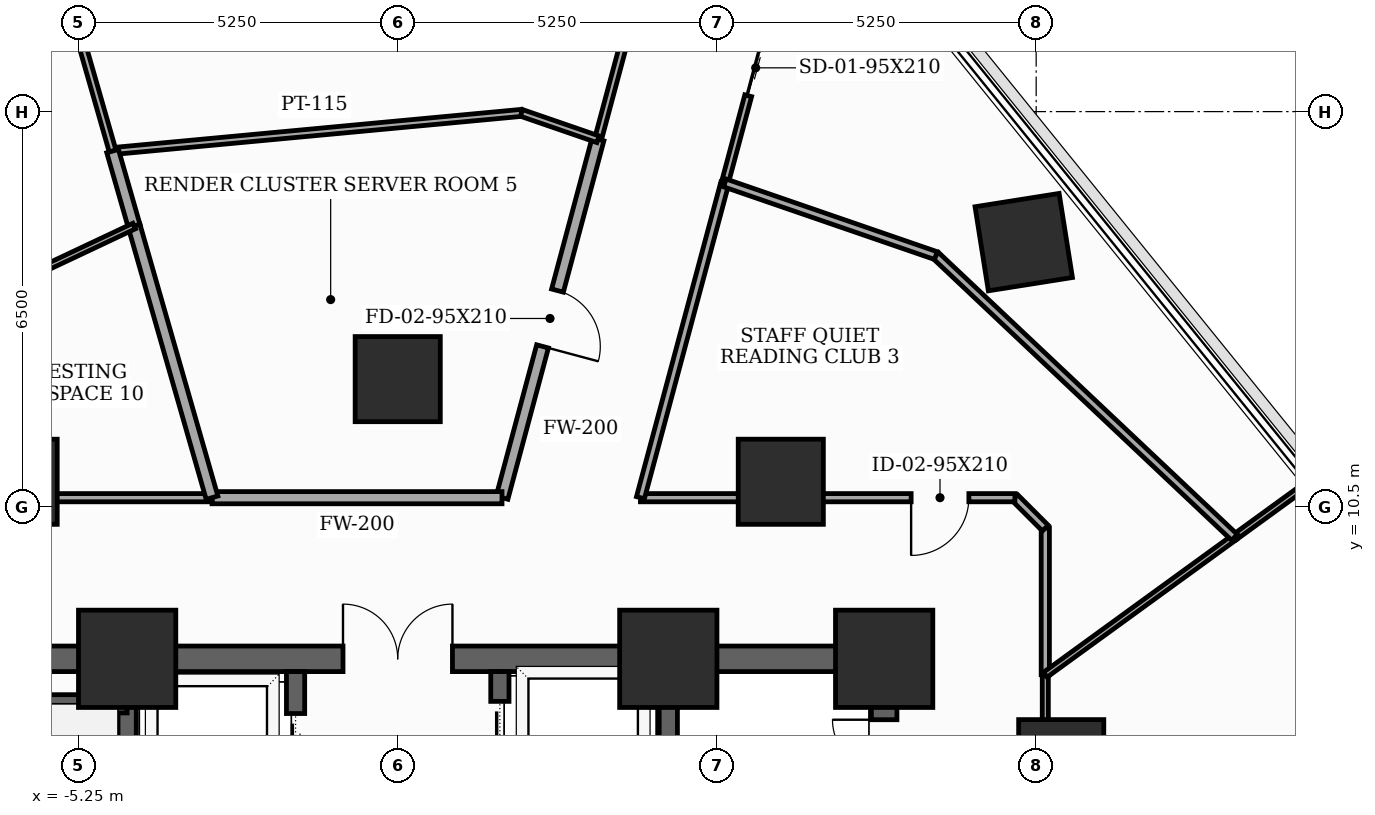
"""IFC4 building model, lengths in metres.
Left out: names, types, materials, properties, quantities, classifications, styles, units other than length and angle.
Written with IfcOpenShell. Run it as: python <this file> out.ifc"""

import sys

from ifc_helpers import new_model, si_unit, direction, frame, frame_2d, origin, origin_2d, place, context, subcontext, project, spatial, rectangle, extrude, element, fill, save


model = new_model("IFC4")
c1 = context("Model", 3, precision=1e-05, world=origin(), true_north=direction((0.0, 1.0)))
c2 = subcontext(c1, "Body", "Model", "MODEL_VIEW")
j1 = project(units=[si_unit("LENGTHUNIT", "METRE"), si_unit("PLANEANGLEUNIT", "RADIAN")], contexts=[c1])
p1 = place(None, origin())
s1 = spatial("IfcSite", under=j1, at=p1, CompositionType="ELEMENT")
p2 = place(p1, origin())
s2 = spatial("IfcBuilding", under=s1, at=p2, CompositionType="ELEMENT")
p3 = place(p2, frame((0.0, 0.0, 55.6)))
s3 = spatial("IfcBuildingStorey", under=s2, at=p3, CompositionType="ELEMENT", Elevation=55.6)
for number, where, z_axis, x_axis in (
    (1, (8.0, 8.0, 0.0), (0.0, 0.0, 1.0), (1.0, 0.0, 0.0)),
    (2, (4.45, 8.0, 0.0), (0.0, 0.0, 1.0), (1.0, 0.0, 0.0)),
    (3, (-4.45, 8.0, 0.0), (0.0, 0.0, 1.0), (1.0, 0.0, 0.0)),
):
    element("IfcColumn", number, at=place(p3, frame(where, z_axis=z_axis, x_axis=x_axis)), inside=s3, PredefinedType="COLUMN", context=c2, shape_type="SweptSolid", body=[
        extrude(rectangle(XDim=1.6, YDim=1.6, at=origin_2d()), origin(), (0.0, 0.0, 1.0), 3.7),
    ])
for number, where, z_axis, x_axis in (
    (4, (10.912, 6.3, 0.0), (0.0, 0.0, 1.0), (1.0, 0.0, 0.0)),
    (5, (6.3, 10.912, 0.0), (0.0, 0.0, 1.0), (1.0, 0.0, 0.0)),
    (6, (0.0, 12.6, 0.0), (0.0, 0.0, 1.0), (1.0, 0.0, 0.0)),
    (7, (-6.3, 10.912, 0.0), (0.0, 0.0, 1.0), (1.0, 0.0, 0.0)),
    (8, (10.295, 14.853, 0.0), (0.0, 0.0, 1.0), (0.988, 0.156, 0.0)),
):
    element("IfcColumn", number, at=place(p3, frame(where, z_axis=z_axis, x_axis=x_axis)), inside=s3, PredefinedType="COLUMN", context=c2, shape_type="SweptSolid", body=[
        extrude(rectangle(XDim=1.4, YDim=1.4, at=origin_2d()), origin(), (0.0, 0.0, 1.0), 3.7),
    ])
p4 = place(p3, frame((8.0, -8.0, 0.0), z_axis=(0.0, 0.0, 1.0), x_axis=(0.0, 1.0, 0.0)))
e9 = element("IfcWall", 9, at=p4, inside=s3, PredefinedType="SHEAR", context=c2, shape_type="SweptSolid", body=[
    extrude(rectangle(XDim=16.0, YDim=0.42, at=frame_2d((8.0, 0.0))), origin(), (0.0, 0.0, 1.0), 3.5),
])
p5 = place(p4, frame((9.6, 0.0, 0.0)))
e10 = element("IfcOpeningElement", 10, at=p5, cuts=e9, PredefinedType="OPENING", context=c2, shape_type="SweptSolid", body=[
    extrude(rectangle(XDim=1.05, YDim=2.15, at=frame_2d((0.525, 1.075))), frame((0.0, 0.22, 0.0), z_axis=(0.0, -1.0, 0.0), x_axis=(1.0, 0.0, 0.0)), (0.0, 0.0, 1.0), 0.44),
])
p6 = place(p4, frame((14.148, 0.0, 0.0)))
e11 = element("IfcOpeningElement", 11, at=p6, cuts=e9, PredefinedType="OPENING", context=c2, shape_type="SweptSolid", body=[
    extrude(rectangle(XDim=0.85, YDim=2.02, at=frame_2d((0.425, 1.01))), frame((0.0, 0.22, 0.0), z_axis=(0.0, -1.0, 0.0), x_axis=(1.0, 0.0, 0.0)), (0.0, 0.0, 1.0), 0.44),
])
p7 = place(p3, frame((-8.0, 8.0, 0.0), z_axis=(0.0, 0.0, 1.0), x_axis=(1.0, 0.0, 0.0)))
e12 = element("IfcWall", 12, at=p7, inside=s3, PredefinedType="SHEAR", context=c2, shape_type="SweptSolid", body=[
    extrude(rectangle(XDim=16.0, YDim=0.42, at=frame_2d((8.0, 0.0))), origin(), (0.0, 0.0, 1.0), 3.5),
])
p8 = place(p7, frame((7.1, 0.0, 0.0)))
e13 = element("IfcOpeningElement", 13, at=p8, cuts=e12, PredefinedType="OPENING", context=c2, shape_type="SweptSolid", body=[
    extrude(rectangle(XDim=1.8, YDim=2.15, at=frame_2d((0.9, 1.075))), frame((0.0, 0.22, 0.0), z_axis=(0.0, -1.0, 0.0), x_axis=(1.0, 0.0, 0.0)), (0.0, 0.0, 1.0), 0.44),
])
for number, where, z_axis, x_axis in (
    (14, (-4.45, -7.79, 0.0), (0.0, 0.0, 1.0), (0.0, 1.0, 0.0)),
    (15, (4.45, -7.79, 0.0), (0.0, 0.0, 1.0), (0.0, 1.0, 0.0)),
):
    element("IfcWall", number, at=place(p3, frame(where, z_axis=z_axis, x_axis=x_axis)), inside=s3, PredefinedType="SHEAR", context=c2, shape_type="SweptSolid", body=[
        extrude(rectangle(XDim=15.58, YDim=0.3, at=frame_2d((7.79, 0.0))), origin(), (0.0, 0.0, 1.0), 3.5),
    ])
p9 = place(p3, frame((-7.79, 7.26, 0.0), z_axis=(0.0, 0.0, 1.0), x_axis=(1.0, 0.0, 0.0)))
e16 = element("IfcWall", 16, at=p9, inside=s3, PredefinedType="SHEAR", context=c2, shape_type="SweptSolid", body=[
    extrude(rectangle(XDim=3.34, YDim=0.3, at=frame_2d((1.67, 0.0))), origin(), (0.0, 0.0, 1.0), 3.5),
])
p10 = place(p3, frame((-1.68, -4.85, 0.0), z_axis=(0.0, 0.0, 1.0), x_axis=(0.0, 1.0, 0.0)))
e17 = element("IfcWall", 17, at=p10, inside=s3, PredefinedType="SHEAR", context=c2, shape_type="SweptSolid", body=[
    extrude(rectangle(XDim=12.64, YDim=0.3, at=frame_2d((6.32, 0.0))), origin(), (0.0, 0.0, 1.0), 3.5),
])
p11 = place(p10, frame((3.95, 0.0, 0.0)))
e18 = element("IfcOpeningElement", 18, at=p11, cuts=e17, PredefinedType="OPENING", context=c2, shape_type="SweptSolid", body=[
    extrude(rectangle(XDim=1.1, YDim=2.1, at=frame_2d((0.55, 1.05))), frame((0.0, 0.16, 0.0), z_axis=(0.0, -1.0, 0.0), x_axis=(1.0, 0.0, 0.0)), (0.0, 0.0, 1.0), 0.32),
])
p12 = place(p10, frame((6.25, 0.0, 0.0)))
e19 = element("IfcOpeningElement", 19, at=p12, cuts=e17, PredefinedType="OPENING", context=c2, shape_type="SweptSolid", body=[
    extrude(rectangle(XDim=1.1, YDim=2.1, at=frame_2d((0.55, 1.05))), frame((0.0, 0.16, 0.0), z_axis=(0.0, -1.0, 0.0), x_axis=(1.0, 0.0, 0.0)), (0.0, 0.0, 1.0), 0.32),
])
p13 = place(p10, frame((8.55, 0.0, 0.0)))
e20 = element("IfcOpeningElement", 20, at=p13, cuts=e17, PredefinedType="OPENING", context=c2, shape_type="SweptSolid", body=[
    extrude(rectangle(XDim=1.1, YDim=2.1, at=frame_2d((0.55, 1.05))), frame((0.0, 0.16, 0.0), z_axis=(0.0, -1.0, 0.0), x_axis=(1.0, 0.0, 0.0)), (0.0, 0.0, 1.0), 0.32),
])
p14 = place(p10, frame((10.85, 0.0, 0.0)))
e21 = element("IfcOpeningElement", 21, at=p14, cuts=e17, PredefinedType="OPENING", context=c2, shape_type="SweptSolid", body=[
    extrude(rectangle(XDim=1.1, YDim=2.1, at=frame_2d((0.55, 1.05))), frame((0.0, 0.16, 0.0), z_axis=(0.0, -1.0, 0.0), x_axis=(1.0, 0.0, 0.0)), (0.0, 0.0, 1.0), 0.32),
])
p15 = place(p10, frame((1.15, 0.0, 0.0)))
e22 = element("IfcOpeningElement", 22, at=p15, cuts=e17, PredefinedType="OPENING", context=c2, shape_type="SweptSolid", body=[
    extrude(rectangle(XDim=0.92, YDim=2.1, at=frame_2d((0.46, 1.05))), frame((0.0, 0.16, 0.0), z_axis=(0.0, -1.0, 0.0), x_axis=(1.0, 0.0, 0.0)), (0.0, 0.0, 1.0), 0.32),
])
p16 = place(p3, frame((1.68, -4.85, 0.0), z_axis=(0.0, 0.0, 1.0), x_axis=(0.0, 1.0, 0.0)))
e23 = element("IfcWall", 23, at=p16, inside=s3, PredefinedType="SHEAR", context=c2, shape_type="SweptSolid", body=[
    extrude(rectangle(XDim=12.64, YDim=0.3, at=frame_2d((6.32, 0.0))), origin(), (0.0, 0.0, 1.0), 3.5),
])
p17 = place(p16, frame((0.55, 0.0, 0.0)))
e24 = element("IfcOpeningElement", 24, at=p17, cuts=e23, PredefinedType="OPENING", context=c2, shape_type="SweptSolid", body=[
    extrude(rectangle(XDim=1.1, YDim=2.1, at=frame_2d((0.55, 1.05))), frame((0.0, 0.16, 0.0), z_axis=(0.0, -1.0, 0.0), x_axis=(1.0, 0.0, 0.0)), (0.0, 0.0, 1.0), 0.32),
])
p18 = place(p16, frame((2.65, 0.0, 0.0)))
e25 = element("IfcOpeningElement", 25, at=p18, cuts=e23, PredefinedType="OPENING", context=c2, shape_type="SweptSolid", body=[
    extrude(rectangle(XDim=1.1, YDim=2.1, at=frame_2d((0.55, 1.05))), frame((0.0, 0.16, 0.0), z_axis=(0.0, -1.0, 0.0), x_axis=(1.0, 0.0, 0.0)), (0.0, 0.0, 1.0), 0.32),
])
p19 = place(p16, frame((4.75, 0.0, 0.0)))
e26 = element("IfcOpeningElement", 26, at=p19, cuts=e23, PredefinedType="OPENING", context=c2, shape_type="SweptSolid", body=[
    extrude(rectangle(XDim=1.1, YDim=2.1, at=frame_2d((0.55, 1.05))), frame((0.0, 0.16, 0.0), z_axis=(0.0, -1.0, 0.0), x_axis=(1.0, 0.0, 0.0)), (0.0, 0.0, 1.0), 0.32),
])
p20 = place(p16, frame((6.85, 0.0, 0.0)))
e27 = element("IfcOpeningElement", 27, at=p20, cuts=e23, PredefinedType="OPENING", context=c2, shape_type="SweptSolid", body=[
    extrude(rectangle(XDim=1.1, YDim=2.1, at=frame_2d((0.55, 1.05))), frame((0.0, 0.16, 0.0), z_axis=(0.0, -1.0, 0.0), x_axis=(1.0, 0.0, 0.0)), (0.0, 0.0, 1.0), 0.32),
])
p21 = place(p16, frame((8.95, 0.0, 0.0)))
e28 = element("IfcOpeningElement", 28, at=p21, cuts=e23, PredefinedType="OPENING", context=c2, shape_type="SweptSolid", body=[
    extrude(rectangle(XDim=1.1, YDim=2.1, at=frame_2d((0.55, 1.05))), frame((0.0, 0.16, 0.0), z_axis=(0.0, -1.0, 0.0), x_axis=(1.0, 0.0, 0.0)), (0.0, 0.0, 1.0), 0.32),
])
p22 = place(p16, frame((11.05, 0.0, 0.0)))
e29 = element("IfcOpeningElement", 29, at=p22, cuts=e23, PredefinedType="OPENING", context=c2, shape_type="SweptSolid", body=[
    extrude(rectangle(XDim=1.1, YDim=2.1, at=frame_2d((0.55, 1.05))), frame((0.0, 0.16, 0.0), z_axis=(0.0, -1.0, 0.0), x_axis=(1.0, 0.0, 0.0)), (0.0, 0.0, 1.0), 0.32),
])
p23 = place(p3, frame((10.65, -1.715, 0.0), z_axis=(0.0, 0.0, 1.0), x_axis=(0.0, 1.0, 0.0)))
e30 = element("IfcWall", 30, at=p23, inside=s3, PredefinedType="MOVABLE", context=c2, shape_type="SweptSolid", body=[
    extrude(rectangle(XDim=9.453, YDim=0.1, at=frame_2d((4.727, 0.0))), origin(), (0.0, 0.0, 1.0), 2.785),
])
p24 = place(p3, frame((10.65, 7.738, 0.0), z_axis=(0.0, 0.0, 1.0), x_axis=(0.0, 1.0, 0.0)))
e31 = element("IfcWall", 31, at=p24, inside=s3, PredefinedType="PARTITIONING", context=c2, shape_type="SweptSolid", body=[
    extrude(rectangle(XDim=2.412, YDim=0.135, at=frame_2d((1.206, 0.0))), origin(), (0.0, 0.0, 1.0), 3.5),
])
p25 = place(p3, frame((10.65, 10.15, 0.0), z_axis=(0.0, 0.0, 1.0), x_axis=(-0.707106781187, 0.707106781187, 0.0)))
e32 = element("IfcWall", 32, at=p25, inside=s3, PredefinedType="PARTITIONING", context=c2, shape_type="SweptSolid", body=[
    extrude(rectangle(XDim=0.707, YDim=0.135, at=frame_2d((0.354, 0.0))), origin(), (0.0, 0.0, 1.0), 3.5),
])
p26 = place(p3, frame((10.15, 10.65, 0.0), z_axis=(0.0, 0.0, 1.0), x_axis=(-1.0, 0.0, 0.0)))
e33 = element("IfcWall", 33, at=p26, inside=s3, PredefinedType="PARTITIONING", context=c2, shape_type="SweptSolid", body=[
    extrude(rectangle(XDim=6.158, YDim=0.135, at=frame_2d((3.079, 0.0))), origin(), (0.0, 0.0, 1.0), 2.785),
])
p27 = place(p26, frame((0.757, 0.0, 0.0)))
e34 = element("IfcOpeningElement", 34, at=p27, cuts=e33, PredefinedType="OPENING", context=c2, shape_type="SweptSolid", body=[
    extrude(rectangle(XDim=0.95, YDim=2.1, at=frame_2d((0.475, 1.05))), frame((0.0, 0.077, 0.0), z_axis=(0.0, -1.0, 0.0), x_axis=(1.0, 0.0, 0.0)), (0.0, 0.0, 1.0), 0.155),
])
p28 = place(p3, frame((3.992, 10.65, 0.0), z_axis=(0.0, 0.0, 1.0), x_axis=(0.258952377387, 0.965890090148, 0.0)))
e35 = element("IfcWall", 35, at=p28, inside=s3, PredefinedType="PARTITIONING", context=c2, shape_type="SweptSolid", body=[
    extrude(rectangle(XDim=5.36, YDim=0.135, at=frame_2d((2.68, 0.0))), origin(), (0.0, 0.0, 1.0), 2.785),
])
p29 = place(p3, frame((5.38, 15.827, 0.0), z_axis=(0.0, 0.0, 1.0), x_axis=(0.258740236453, 0.965946939557, 0.0)))
e36 = element("IfcWall", 36, at=p29, inside=s3, PredefinedType="PARTITIONING", context=c2, shape_type="SweptSolid", body=[
    extrude(rectangle(XDim=3.92, YDim=0.115, at=frame_2d((1.96, 0.0))), origin(), (0.0, 0.0, 1.0), 2.935),
])
p30 = place(p29, frame((1.485, 0.0, 0.0)))
e37 = element("IfcOpeningElement", 37, at=p30, cuts=e36, PredefinedType="OPENING", context=c2, shape_type="SweptSolid", body=[
    extrude(rectangle(XDim=0.95, YDim=2.1, at=frame_2d((0.475, 1.05))), frame((0.0, 0.067, 0.0), z_axis=(0.0, -1.0, 0.0), x_axis=(1.0, 0.0, 0.0)), (0.0, 0.0, 1.0), 0.135),
])
p31 = place(p3, frame((4.269, 20.183, 0.0), z_axis=(0.0, 0.0, 1.0), x_axis=(-0.258880798168, -0.965909277489, 0.0)))
e38 = element("IfcWall", 38, at=p31, inside=s3, PredefinedType="PARTITIONING", context=c2, shape_type="SweptSolid", body=[
    extrude(rectangle(XDim=3.767, YDim=0.115, at=frame_2d((1.883, 0.0))), origin(), (0.0, 0.0, 1.0), 3.085),
])
p32 = place(p3, frame((3.294, 16.545, 0.0), z_axis=(0.0, 0.0, 1.0), x_axis=(-0.258710756328, -0.965954835673, 0.0)))
e39 = element("IfcWall", 39, at=p32, inside=s3, PredefinedType="SOLIDWALL", context=c2, shape_type="SweptSolid", body=[
    extrude(rectangle(XDim=6.103, YDim=0.2, at=frame_2d((3.051, 0.0))), origin(), (0.0, 0.0, 1.0), 2.785),
])
p33 = place(p32, frame((2.576, 0.0, 0.0)))
e40 = element("IfcOpeningElement", 40, at=p33, cuts=e39, PredefinedType="OPENING", context=c2, shape_type="SweptSolid", body=[
    extrude(rectangle(XDim=0.95, YDim=2.1, at=frame_2d((0.475, 1.05))), frame((0.0, 0.11, 0.0), z_axis=(0.0, -1.0, 0.0), x_axis=(1.0, 0.0, 0.0)), (0.0, 0.0, 1.0), 0.22),
])
p34 = place(p3, frame((1.715, 10.65, 0.0), z_axis=(0.0, 0.0, 1.0), x_axis=(-1.0, 0.0, 0.0)))
e41 = element("IfcWall", 41, at=p34, inside=s3, PredefinedType="SOLIDWALL", context=c2, shape_type="SweptSolid", body=[
    extrude(rectangle(XDim=4.769, YDim=0.2, at=frame_2d((2.385, 0.0))), origin(), (0.0, 0.0, 1.0), 2.785),
])
p35 = place(p3, frame((-3.054, 10.65, 0.0), z_axis=(0.0, 0.0, 1.0), x_axis=(-1.0, 0.0, 0.0)))
e42 = element("IfcWall", 42, at=p35, inside=s3, PredefinedType="PARTITIONING", context=c2, shape_type="SweptSolid", body=[
    extrude(rectangle(XDim=7.096, YDim=0.135, at=frame_2d((3.548, 0.0))), origin(), (0.0, 0.0, 1.0), 2.785),
])
p36 = place(p3, frame((13.761, 9.998, 0.0), z_axis=(0.0, 0.0, 1.0), x_axis=(-0.809057190408, -0.587729923221, 0.0)))
e43 = element("IfcWall", 43, at=p36, inside=s3, PredefinedType="MOVABLE", context=c2, shape_type="SweptSolid", body=[
    extrude(rectangle(XDim=3.845, YDim=0.1, at=frame_2d((1.923, 0.0))), origin(), (0.0, 0.0, 1.0), 3.085),
])
p37 = place(p3, frame((15.002, 10.9, 0.0), z_axis=(0.0, 0.0, 1.0), x_axis=(-0.809128115206, -0.587632277179, 0.0)))
e44 = element("IfcWall", 44, at=p37, inside=s3, PredefinedType="MOVABLE", context=c2, shape_type="SweptSolid", body=[
    extrude(rectangle(XDim=1.534, YDim=0.1, at=frame_2d((0.767, 0.0))), origin(), (0.0, 0.0, 1.0), 2.935),
])
p38 = place(p3, frame((13.761, 9.998, 0.0), z_axis=(0.0, 0.0, 1.0), x_axis=(-0.727310898058, 0.68630813602, 0.0)))
e45 = element("IfcWall", 45, at=p38, inside=s3, PredefinedType="PARTITIONING", context=c2, shape_type="SweptSolid", body=[
    extrude(rectangle(XDim=6.752, YDim=0.135, at=frame_2d((3.376, 0.0))), origin(), (0.0, 0.0, 1.0), 2.785),
])
p39 = place(p3, frame((8.85, 14.632, 0.0), z_axis=(0.0, 0.0, 1.0), x_axis=(-0.945524159467, 0.325551937275, 0.0)))
e46 = element("IfcWall", 46, at=p39, inside=s3, PredefinedType="PARTITIONING", context=c2, shape_type="SweptSolid", body=[
    extrude(rectangle(XDim=3.67, YDim=0.135, at=frame_2d((1.835, 0.0))), origin(), (0.0, 0.0, 1.0), 3.085),
])
p40 = place(p3, frame((-4.689, 16.351, 0.0), z_axis=(0.0, 0.0, 1.0), x_axis=(0.995667654368, 0.092983450384, 0.0)))
e47 = element("IfcWall", 47, at=p40, inside=s3, PredefinedType="PARTITIONING", context=c2, shape_type="SweptSolid", body=[
    extrude(rectangle(XDim=6.753, YDim=0.115, at=frame_2d((3.376, 0.0))), origin(), (0.0, 0.0, 1.0), 2.785),
])
p41 = place(p3, frame((2.035, 16.979, 0.0), z_axis=(0.0, 0.0, 1.0), x_axis=(0.945388565789, -0.325945485742, 0.0)))
e48 = element("IfcWall", 48, at=p41, inside=s3, PredefinedType="PARTITIONING", context=c2, shape_type="SweptSolid", body=[
    extrude(rectangle(XDim=1.332, YDim=0.115, at=frame_2d((0.666, 0.0))), origin(), (0.0, 0.0, 1.0), 3.5),
])
p42 = place(p3, frame((-8.481, 29.58, 0.0), z_axis=(0.0, 0.0, 1.0), x_axis=(0.275587979828, -0.961275852903, 0.0)))
e49 = element("IfcWall", 49, at=p42, inside=s3, PredefinedType="PARTITIONING", context=c2, shape_type="SweptSolid", body=[
    extrude(rectangle(XDim=13.761, YDim=0.115, at=frame_2d((6.881, 0.0))), origin(), (0.0, 0.0, 1.0), 2.935),
])
p43 = place(p42, frame((6.421, 0.0, 0.0)))
e50 = element("IfcOpeningElement", 50, at=p43, cuts=e49, PredefinedType="OPENING", context=c2, shape_type="SweptSolid", body=[
    extrude(rectangle(XDim=0.92, YDim=2.1, at=frame_2d((0.46, 1.05))), frame((0.0, 0.067, 0.0), z_axis=(0.0, -1.0, 0.0), x_axis=(1.0, 0.0, 0.0)), (0.0, 0.0, 1.0), 0.135),
])
p44 = place(p3, frame((-4.689, 16.351, 0.0), z_axis=(0.0, 0.0, 1.0), x_axis=(0.275927308223, -0.961178506094, 0.0)))
e51 = element("IfcWall", 51, at=p44, inside=s3, PredefinedType="SOLIDWALL", context=c2, shape_type="SweptSolid", body=[
    extrude(rectangle(XDim=1.283, YDim=0.2, at=frame_2d((0.642, 0.0))), origin(), (0.0, 0.0, 1.0), 3.5),
])
p45 = place(p3, frame((-4.335, 15.118, 0.0), z_axis=(0.0, 0.0, 1.0), x_axis=(0.275602055924, -0.961271817318, 0.0)))
e52 = element("IfcWall", 52, at=p45, inside=s3, PredefinedType="SOLIDWALL", context=c2, shape_type="SweptSolid", body=[
    extrude(rectangle(XDim=4.648, YDim=0.2, at=frame_2d((2.324, 0.0))), origin(), (0.0, 0.0, 1.0), 2.785),
])
p46 = place(p3, frame((-9.287, 12.782, 0.0), z_axis=(0.0, 0.0, 1.0), x_axis=(0.904430294069, 0.4266214284, 0.0)))
e53 = element("IfcWall", 53, at=p46, inside=s3, PredefinedType="MOVABLE", context=c2, shape_type="SweptSolid", body=[
    extrude(rectangle(XDim=5.475, YDim=0.1, at=frame_2d((2.738, 0.0))), origin(), (0.0, 0.0, 1.0), 2.785),
])
p47 = place(p6, origin())
e54 = element("IfcDoor", 54, at=p47, inside=s3, OperationType="SINGLE_SWING_RIGHT", PredefinedType="TRAPDOOR", context=c2, shape_type="SweptSolid", body=[
    extrude(rectangle(XDim=0.85, YDim=2.02, at=frame_2d((0.425, 1.01))), frame((0.0, 0.025, 0.0), z_axis=(0.0, -1.0, 0.0), x_axis=(1.0, 0.0, 0.0)), (0.0, 0.0, 1.0), 0.05),
])
fill(e11, e54)
p48 = place(p8, origin())
e55 = element("IfcDoor", 55, at=p48, inside=s3, OperationType="DOUBLE_DOOR_SINGLE_SWING", PredefinedType="DOOR", context=c2, shape_type="SweptSolid", body=[
    extrude(rectangle(XDim=1.8, YDim=2.15, at=frame_2d((0.9, 1.075))), frame((0.0, 0.025, 0.0), z_axis=(0.0, -1.0, 0.0), x_axis=(1.0, 0.0, 0.0)), (0.0, 0.0, 1.0), 0.05),
])
fill(e13, e55)
p49 = place(p14, origin())
e56 = element("IfcDoor", 56, at=p49, inside=s3, OperationType="SLIDING_TO_LEFT", PredefinedType="DOOR", context=c2, shape_type="SweptSolid", body=[
    extrude(rectangle(XDim=1.1, YDim=2.1, at=frame_2d((0.55, 1.05))), frame((0.0, 0.025, 0.0), z_axis=(0.0, -1.0, 0.0), x_axis=(1.0, 0.0, 0.0)), (0.0, 0.0, 1.0), 0.05),
])
fill(e21, e56)
p50 = place(p22, origin())
e57 = element("IfcDoor", 57, at=p50, inside=s3, OperationType="SLIDING_TO_LEFT", PredefinedType="DOOR", context=c2, shape_type="SweptSolid", body=[
    extrude(rectangle(XDim=1.1, YDim=2.1, at=frame_2d((0.55, 1.05))), frame((0.0, 0.025, 0.0), z_axis=(0.0, -1.0, 0.0), x_axis=(1.0, 0.0, 0.0)), (0.0, 0.0, 1.0), 0.05),
])
fill(e29, e57)
p51 = place(p27, origin())
e58 = element("IfcDoor", 58, at=p51, inside=s3, OperationType="SINGLE_SWING_RIGHT", PredefinedType="DOOR", context=c2, shape_type="SweptSolid", body=[
    extrude(rectangle(XDim=0.95, YDim=2.1, at=frame_2d((0.475, 1.05))), frame((0.0, 0.025, 0.0), z_axis=(0.0, -1.0, 0.0), x_axis=(1.0, 0.0, 0.0)), (0.0, 0.0, 1.0), 0.05),
])
fill(e34, e58)
p52 = place(p30, origin())
e59 = element("IfcDoor", 59, at=p52, inside=s3, OperationType="SLIDING_TO_LEFT", PredefinedType="DOOR", context=c2, shape_type="SweptSolid", body=[
    extrude(rectangle(XDim=0.95, YDim=2.1, at=frame_2d((0.475, 1.05))), frame((0.0, 0.025, 0.0), z_axis=(0.0, -1.0, 0.0), x_axis=(1.0, 0.0, 0.0)), (0.0, 0.0, 1.0), 0.05),
])
fill(e37, e59)
p53 = place(p33, origin())
e60 = element("IfcDoor", 60, at=p53, inside=s3, OperationType="SINGLE_SWING_RIGHT", PredefinedType="DOOR", context=c2, shape_type="SweptSolid", body=[
    extrude(rectangle(XDim=0.95, YDim=2.1, at=frame_2d((0.475, 1.05))), frame((0.0, 0.025, 0.0), z_axis=(0.0, -1.0, 0.0), x_axis=(1.0, 0.0, 0.0)), (0.0, 0.0, 1.0), 0.05),
])
fill(e40, e60)
save(model, sys.argv[1])
